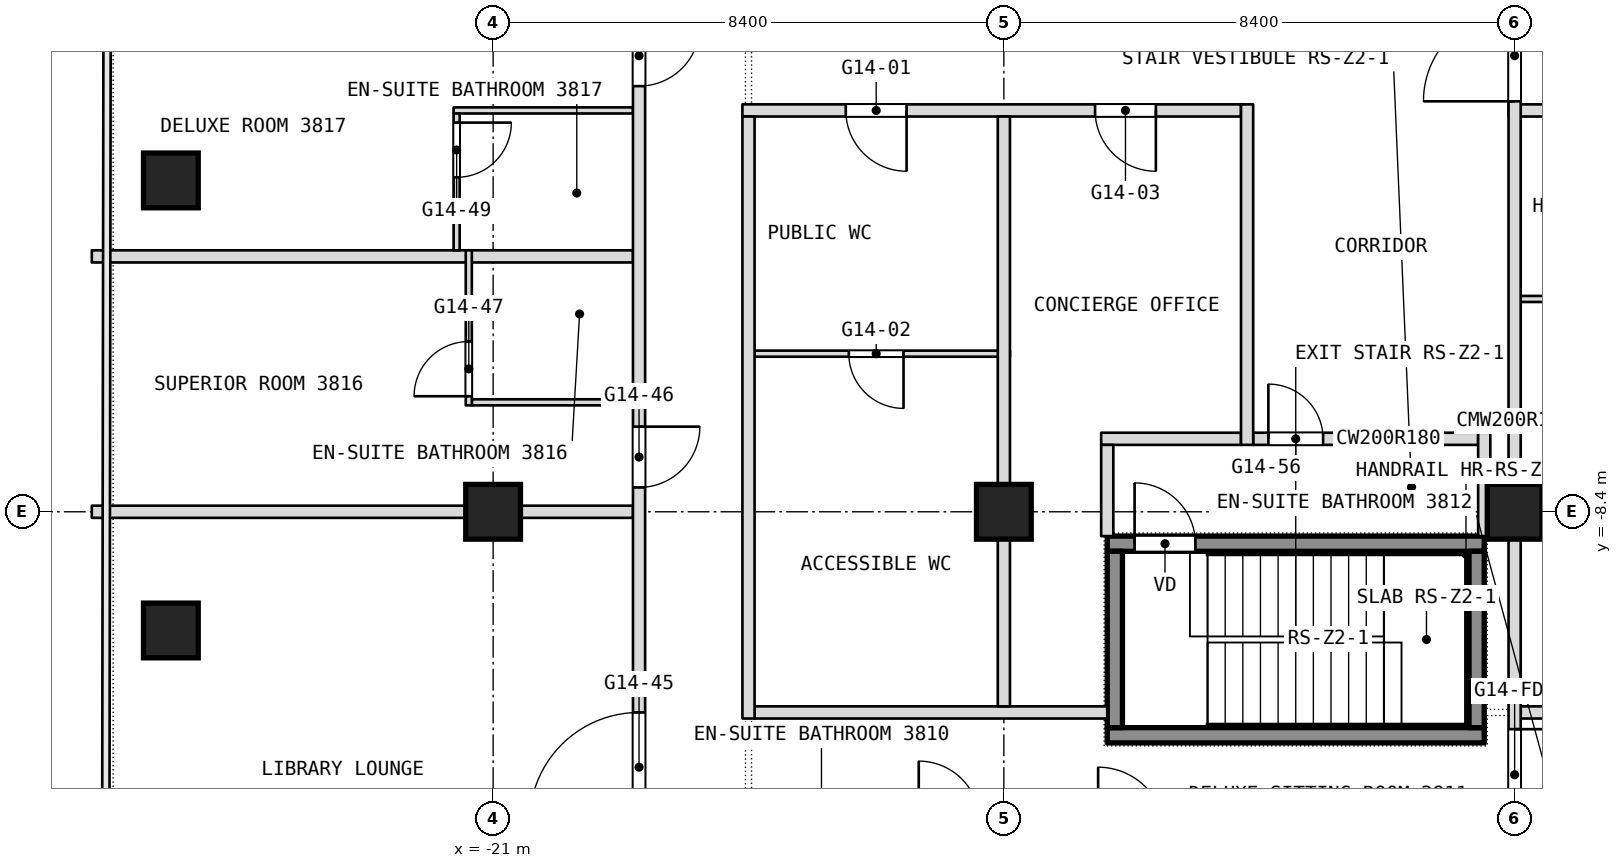
"""IFC4 building model, lengths in metres.
Left out: names, types, materials, properties, quantities, classifications, styles, units other than length and angle.
Written with IfcOpenShell. Run it as: python <this file> out.ifc"""

import sys

from ifc_helpers import new_model, si_unit, direction, frame, frame_2d, origin, origin_2d, place, context, subcontext, project, spatial, rectangle, extrude, element, fill, save


model = new_model("IFC4")
c1 = context("Model", 3, precision=1e-05, world=origin(), true_north=direction((0.0, 1.0)))
c2 = subcontext(c1, "Body", "Model", "MODEL_VIEW")
j1 = project(units=[si_unit("LENGTHUNIT", "METRE"), si_unit("PLANEANGLEUNIT", "RADIAN")], contexts=[c1])
p1 = place(None, origin())
s1 = spatial("IfcSite", under=j1, at=p1, CompositionType="ELEMENT")
p2 = place(p1, origin())
s2 = spatial("IfcBuilding", under=s1, at=p2, CompositionType="ELEMENT")
p3 = place(p2, frame((0.0, 0.0, 162.5)))
s3 = spatial("IfcBuildingStorey", under=s2, at=p3, CompositionType="ELEMENT", Elevation=162.5)
for number, where, z_axis, x_axis in (
    (1, (-21.0, -8.4, 0.0), (0.0, 0.0, 1.0), (1.0, 0.0, 0.0)),
    (2, (-12.6, -8.4, 0.0), (0.0, 0.0, 1.0), (1.0, 0.0, 0.0)),
    (3, (-4.2, -8.4, 0.0), (0.0, 0.0, 1.0), (1.0, 0.0, 0.0)),
    (4, (-26.3, -10.352, 0.0), (0.0, 0.0, 1.0), (1.0, 0.0, 0.0)),
    (5, (-26.3, -2.951, 0.0), (0.0, 0.0, 1.0), (1.0, 0.0, 0.0)),
):
    element("IfcColumn", number, at=place(p3, frame(where, z_axis=z_axis, x_axis=x_axis)), inside=s3, PredefinedType="COLUMN", context=c2, shape_type="SweptSolid", body=[
        extrude(rectangle(XDim=0.9, YDim=0.9, at=origin_2d()), origin(), (0.0, 0.0, 1.0), 3.6),
    ])
p4 = place(p3, frame((-16.7, -11.7, 0.0), z_axis=(0.0, 0.0, 1.0), x_axis=(1.0, 0.0, 0.0)))
e6 = element("IfcWall", 6, at=p4, inside=s3, PredefinedType="PARTITIONING", context=c2, shape_type="SweptSolid", body=[
    extrude(rectangle(XDim=5.8, YDim=0.2, at=frame_2d((2.9, 0.0))), origin(), (0.0, 0.0, 1.0), 3.34),
])
p5 = place(p3, frame((-4.1, -11.7, 0.0), z_axis=(0.0, 0.0, 1.0), x_axis=(1.0, 0.0, 0.0)))
e7 = element("IfcWall", 7, at=p5, inside=s3, PredefinedType="PARTITIONING", context=c2, shape_type="SweptSolid", body=[
    extrude(rectangle(XDim=20.8, YDim=0.2, at=frame_2d((10.4, 0.0))), origin(), (0.0, 0.0, 1.0), 3.34),
])
p6 = place(p5, frame((14.1, 0.0, 0.0)))
e8 = element("IfcOpeningElement", 8, at=p6, cuts=e7, PredefinedType="OPENING", context=c2, shape_type="SweptSolid", body=[
    extrude(rectangle(XDim=1.0, YDim=2.1, at=frame_2d((0.5, 1.05))), frame((0.0, 0.1, 0.0), z_axis=(0.0, -1.0, 0.0), x_axis=(1.0, 0.0, 0.0)), (0.0, 0.0, 1.0), 0.2),
])
p7 = place(p5, frame((5.7, 0.0, 0.0)))
e9 = element("IfcOpeningElement", 9, at=p7, cuts=e7, PredefinedType="OPENING", context=c2, shape_type="SweptSolid", body=[
    extrude(rectangle(XDim=1.0, YDim=2.1, at=frame_2d((0.5, 1.05))), frame((0.0, 0.1, 0.0), z_axis=(0.0, -1.0, 0.0), x_axis=(1.0, 0.0, 0.0)), (0.0, 0.0, 1.0), 0.2),
])
p8 = place(p3, frame((-27.6, -8.4, 0.0), z_axis=(0.0, 0.0, 1.0), x_axis=(1.0, 0.0, 0.0)))
e10 = element("IfcWall", 10, at=p8, inside=s3, PredefinedType="PARTITIONING", context=c2, shape_type="SweptSolid", body=[
    extrude(rectangle(XDim=8.9, YDim=0.2, at=frame_2d((4.45, 0.0))), origin(), (0.0, 0.0, 1.0), 2.89),
])
p9 = place(p3, frame((-11.0, -7.2, 0.0), z_axis=(0.0, 0.0, 1.0), x_axis=(1.0, 0.0, 0.0)))
e11 = element("IfcWall", 11, at=p9, inside=s3, PredefinedType="PARTITIONING", context=c2, shape_type="SweptSolid", body=[
    extrude(rectangle(XDim=2.3, YDim=0.2, at=frame_2d((1.15, 0.0))), origin(), (0.0, 0.0, 1.0), 3.34),
])
p10 = place(p3, frame((-8.5, -7.2, 0.0), z_axis=(0.0, 0.0, 1.0), x_axis=(1.0, 0.0, 0.0)))
e12 = element("IfcWall", 12, at=p10, inside=s3, PredefinedType="PARTITIONING", context=c2, shape_type="SweptSolid", body=[
    extrude(rectangle(XDim=3.7, YDim=0.2, at=frame_2d((1.85, 0.0))), origin(), (0.0, 0.0, 1.0), 3.34),
])
p11 = place(p10, frame((0.25, 0.0, 0.0)))
e13 = element("IfcOpeningElement", 13, at=p11, cuts=e12, PredefinedType="OPENING", context=c2, shape_type="SweptSolid", body=[
    extrude(rectangle(XDim=0.9, YDim=2.1, at=frame_2d((0.45, 1.05))), frame((0.0, 0.1, 0.0), z_axis=(0.0, -1.0, 0.0), x_axis=(1.0, 0.0, 0.0)), (0.0, 0.0, 1.0), 0.2),
])
p12 = place(p3, frame((-21.35, -6.6, 0.0), z_axis=(0.0, 0.0, 1.0), x_axis=(1.0, 0.0, 0.0)))
e14 = element("IfcWall", 14, at=p12, inside=s3, PredefinedType="PARTITIONING", context=c2, shape_type="SweptSolid", body=[
    extrude(rectangle(XDim=2.65, YDim=0.1, at=frame_2d((1.325, 0.0))), origin(), (0.0, 0.0, 1.0), 3.34),
])
p13 = place(p3, frame((-16.7, -5.8, 0.0), z_axis=(0.0, 0.0, 1.0), x_axis=(1.0, 0.0, 0.0)))
e15 = element("IfcWall", 15, at=p13, inside=s3, PredefinedType="PARTITIONING", context=c2, shape_type="SweptSolid", body=[
    extrude(rectangle(XDim=4.2, YDim=0.1, at=frame_2d((2.1, 0.0))), origin(), (0.0, 0.0, 1.0), 3.34),
])
p14 = place(p13, frame((1.55, 0.0, 0.0)))
e16 = element("IfcOpeningElement", 16, at=p14, cuts=e15, PredefinedType="OPENING", context=c2, shape_type="SweptSolid", body=[
    extrude(rectangle(XDim=0.9, YDim=2.1, at=frame_2d((0.45, 1.05))), frame((0.0, 0.05, 0.0), z_axis=(0.0, -1.0, 0.0), x_axis=(1.0, 0.0, 0.0)), (0.0, 0.0, 1.0), 0.1),
])
p15 = place(p3, frame((-4.1, -4.9, 0.0), z_axis=(0.0, 0.0, 1.0), x_axis=(1.0, 0.0, 0.0)))
e17 = element("IfcWall", 17, at=p15, inside=s3, PredefinedType="PARTITIONING", context=c2, shape_type="SweptSolid", body=[
    extrude(rectangle(XDim=4.2, YDim=0.1, at=frame_2d((2.1, 0.0))), origin(), (0.0, 0.0, 1.0), 3.34),
])
p16 = place(p15, frame((1.55, 0.0, 0.0)))
e18 = element("IfcOpeningElement", 18, at=p16, cuts=e17, PredefinedType="OPENING", context=c2, shape_type="SweptSolid", body=[
    extrude(rectangle(XDim=0.9, YDim=2.1, at=frame_2d((0.45, 1.05))), frame((0.0, 0.05, 0.0), z_axis=(0.0, -1.0, 0.0), x_axis=(1.0, 0.0, 0.0)), (0.0, 0.0, 1.0), 0.1),
])
p17 = place(p3, frame((-27.6, -4.2, 0.0), z_axis=(0.0, 0.0, 1.0), x_axis=(1.0, 0.0, 0.0)))
e19 = element("IfcWall", 19, at=p17, inside=s3, PredefinedType="PARTITIONING", context=c2, shape_type="SweptSolid", body=[
    extrude(rectangle(XDim=8.9, YDim=0.2, at=frame_2d((4.45, 0.0))), origin(), (0.0, 0.0, 1.0), 3.34),
])
p18 = place(p3, frame((-21.65, -1.8, 0.0), z_axis=(0.0, 0.0, 1.0), x_axis=(1.0, 0.0, 0.0)))
e20 = element("IfcWall", 20, at=p18, inside=s3, PredefinedType="PARTITIONING", context=c2, shape_type="SweptSolid", body=[
    extrude(rectangle(XDim=2.95, YDim=0.1, at=frame_2d((1.475, 0.0))), origin(), (0.0, 0.0, 1.0), 3.34),
])
p19 = place(p3, frame((-16.9, -1.8, 0.0), z_axis=(0.0, 0.0, 1.0), x_axis=(1.0, 0.0, 0.0)))
e21 = element("IfcWall", 21, at=p19, inside=s3, PredefinedType="PARTITIONING", context=c2, shape_type="SweptSolid", body=[
    extrude(rectangle(XDim=8.2, YDim=0.2, at=frame_2d((4.1, 0.0))), origin(), (0.0, 0.0, 1.0), 3.34),
])
p20 = place(p19, frame((1.7, 0.0, 0.0)))
e22 = element("IfcOpeningElement", 22, at=p20, cuts=e21, PredefinedType="OPENING", context=c2, shape_type="SweptSolid", body=[
    extrude(rectangle(XDim=1.0, YDim=2.1, at=frame_2d((0.5, 1.05))), frame((0.0, 0.1, 0.0), z_axis=(0.0, -1.0, 0.0), x_axis=(1.0, 0.0, 0.0)), (0.0, 0.0, 1.0), 0.2),
])
p21 = place(p19, frame((5.8, 0.0, 0.0)))
e23 = element("IfcOpeningElement", 23, at=p21, cuts=e21, PredefinedType="OPENING", context=c2, shape_type="SweptSolid", body=[
    extrude(rectangle(XDim=1.0, YDim=2.1, at=frame_2d((0.5, 1.05))), frame((0.0, 0.1, 0.0), z_axis=(0.0, -1.0, 0.0), x_axis=(1.0, 0.0, 0.0)), (0.0, 0.0, 1.0), 0.2),
])
p22 = place(p3, frame((-4.3, -1.8, 0.0), z_axis=(0.0, 0.0, 1.0), x_axis=(1.0, 0.0, 0.0)))
e24 = element("IfcWall", 24, at=p22, inside=s3, PredefinedType="PARTITIONING", context=c2, shape_type="SweptSolid", body=[
    extrude(rectangle(XDim=11.3, YDim=0.2, at=frame_2d((5.65, 0.0))), origin(), (0.0, 0.0, 1.0), 3.34),
])
p23 = place(p22, frame((1.7, 0.0, 0.0)))
e25 = element("IfcOpeningElement", 25, at=p23, cuts=e24, PredefinedType="OPENING", context=c2, shape_type="SweptSolid", body=[
    extrude(rectangle(XDim=1.0, YDim=2.1, at=frame_2d((0.5, 1.05))), frame((0.0, 0.1, 0.0), z_axis=(0.0, -1.0, 0.0), x_axis=(1.0, 0.0, 0.0)), (0.0, 0.0, 1.0), 0.2),
])
p24 = place(p22, frame((10.1, 0.0, 0.0)))
e26 = element("IfcOpeningElement", 26, at=p24, cuts=e24, PredefinedType="OPENING", context=c2, shape_type="SweptSolid", body=[
    extrude(rectangle(XDim=1.0, YDim=2.1, at=frame_2d((0.5, 1.05))), frame((0.0, 0.1, 0.0), z_axis=(0.0, -1.0, 0.0), x_axis=(1.0, 0.0, 0.0)), (0.0, 0.0, 1.0), 0.2),
])
p25 = place(p22, frame((5.9, 0.0, 0.0)))
e27 = element("IfcOpeningElement", 27, at=p25, cuts=e24, PredefinedType="OPENING", context=c2, shape_type="SweptSolid", body=[
    extrude(rectangle(XDim=1.0, YDim=2.1, at=frame_2d((0.5, 1.05))), frame((0.0, 0.1, 0.0), z_axis=(0.0, -1.0, 0.0), x_axis=(1.0, 0.0, 0.0)), (0.0, 0.0, 1.0), 0.2),
])
p26 = place(p3, frame((-4.2, -13.8, 0.0), z_axis=(0.0, 0.0, 1.0), x_axis=(0.0, 1.0, 0.0)))
e28 = element("IfcWall", 28, at=p26, inside=s3, PredefinedType="PARTITIONING", context=c2, shape_type="SweptSolid", body=[
    extrude(rectangle(XDim=13.8, YDim=0.2, at=frame_2d((6.9, 0.0))), origin(), (0.0, 0.0, 1.0), 3.34),
])
p27 = place(p26, frame((12.15, 0.0, 0.0)))
e29 = element("IfcOpeningElement", 29, at=p27, cuts=e28, PredefinedType="OPENING", context=c2, shape_type="SweptSolid", body=[
    extrude(rectangle(XDim=1.5, YDim=2.1, at=frame_2d((0.75, 1.05))), frame((0.0, 0.1, 0.0), z_axis=(0.0, -1.0, 0.0), x_axis=(1.0, 0.0, 0.0)), (0.0, 0.0, 1.0), 0.2),
])
p28 = place(p26, frame((0.325, 0.0, 0.0)))
e30 = element("IfcOpeningElement", 30, at=p28, cuts=e28, PredefinedType="OPENING", context=c2, shape_type="SweptSolid", body=[
    extrude(rectangle(XDim=1.5, YDim=2.1, at=frame_2d((0.75, 1.05))), frame((0.0, 0.1, 0.0), z_axis=(0.0, -1.0, 0.0), x_axis=(1.0, 0.0, 0.0)), (0.0, 0.0, 1.0), 0.2),
])
p29 = place(p3, frame((-4.7, -8.8, 0.0), z_axis=(0.0, 0.0, 1.0), x_axis=(0.0, 1.0, 0.0)))
e31 = element("IfcWall", 31, at=p29, inside=s3, PredefinedType="PARTITIONING", context=c2, shape_type="SweptSolid", body=[
    extrude(rectangle(XDim=1.7, YDim=0.2, at=frame_2d((0.85, 0.0))), origin(), (0.0, 0.0, 1.0), 3.34),
])
p30 = place(p3, frame((-8.6, -7.3, 0.0), z_axis=(0.0, 0.0, 1.0), x_axis=(0.0, 1.0, 0.0)))
e32 = element("IfcWall", 32, at=p30, inside=s3, PredefinedType="PARTITIONING", context=c2, shape_type="SweptSolid", body=[
    extrude(rectangle(XDim=5.6, YDim=0.2, at=frame_2d((2.8, 0.0))), origin(), (0.0, 0.0, 1.0), 3.34),
])
p31 = place(p3, frame((-10.9, -8.8, 0.0), z_axis=(0.0, 0.0, 1.0), x_axis=(0.0, 1.0, 0.0)))
e33 = element("IfcWall", 33, at=p31, inside=s3, PredefinedType="PARTITIONING", context=c2, shape_type="SweptSolid", body=[
    extrude(rectangle(XDim=1.5, YDim=0.2, at=frame_2d((0.75, 0.0))), origin(), (0.0, 0.0, 1.0), 3.34),
])
p32 = place(p3, frame((-12.6, -11.6, 0.0), z_axis=(0.0, 0.0, 1.0), x_axis=(0.0, 1.0, 0.0)))
e34 = element("IfcWall", 34, at=p32, inside=s3, PredefinedType="PARTITIONING", context=c2, shape_type="SweptSolid", body=[
    extrude(rectangle(XDim=9.7, YDim=0.2, at=frame_2d((4.85, 0.0))), origin(), (0.0, 0.0, 1.0), 3.34),
])
p33 = place(p3, frame((-16.8, -11.8, 0.0), z_axis=(0.0, 0.0, 1.0), x_axis=(0.0, 1.0, 0.0)))
e35 = element("IfcWall", 35, at=p33, inside=s3, PredefinedType="PARTITIONING", context=c2, shape_type="SweptSolid", body=[
    extrude(rectangle(XDim=9.9, YDim=0.2, at=frame_2d((4.95, 0.0))), origin(), (0.0, 0.0, 1.0), 3.34),
])
p34 = place(p3, frame((-18.6, -21.708, 0.0), z_axis=(0.0, 0.0, 1.0), x_axis=(0.0, 1.0, 0.0)))
e36 = element("IfcWall", 36, at=p34, inside=s3, PredefinedType="PARTITIONING", context=c2, shape_type="SweptSolid", body=[
    extrude(rectangle(XDim=28.608, YDim=0.2, at=frame_2d((14.304, 0.0))), origin(), (0.0, 0.0, 1.0), 3.34),
])
p35 = place(p34, frame((2.204, 0.0, 0.0)))
e37 = element("IfcOpeningElement", 37, at=p35, cuts=e36, PredefinedType="OPENING", context=c2, shape_type="SweptSolid", body=[
    extrude(rectangle(XDim=1.0, YDim=2.1, at=frame_2d((0.5, 1.05))), frame((0.0, 0.1, 0.0), z_axis=(0.0, -1.0, 0.0), x_axis=(1.0, 0.0, 0.0)), (0.0, 0.0, 1.0), 0.2),
])
p36 = place(p34, frame((8.208, 0.0, 0.0)))
e38 = element("IfcOpeningElement", 38, at=p36, cuts=e36, PredefinedType="OPENING", context=c2, shape_type="SweptSolid", body=[
    extrude(rectangle(XDim=1.8, YDim=2.1, at=frame_2d((0.9, 1.05))), frame((0.0, 0.1, 0.0), z_axis=(0.0, -1.0, 0.0), x_axis=(1.0, 0.0, 0.0)), (0.0, 0.0, 1.0), 0.2),
])
p37 = place(p34, frame((13.708, 0.0, 0.0)))
e39 = element("IfcOpeningElement", 39, at=p37, cuts=e36, PredefinedType="OPENING", context=c2, shape_type="SweptSolid", body=[
    extrude(rectangle(XDim=1.0, YDim=2.1, at=frame_2d((0.5, 1.05))), frame((0.0, 0.1, 0.0), z_axis=(0.0, -1.0, 0.0), x_axis=(1.0, 0.0, 0.0)), (0.0, 0.0, 1.0), 0.2),
])
p38 = place(p34, frame((20.308, 0.0, 0.0)))
e40 = element("IfcOpeningElement", 40, at=p38, cuts=e36, PredefinedType="OPENING", context=c2, shape_type="SweptSolid", body=[
    extrude(rectangle(XDim=1.0, YDim=2.1, at=frame_2d((0.5, 1.05))), frame((0.0, 0.1, 0.0), z_axis=(0.0, -1.0, 0.0), x_axis=(1.0, 0.0, 0.0)), (0.0, 0.0, 1.0), 0.2),
])
p39 = place(p3, frame((-21.4, -6.65, 0.0), z_axis=(0.0, 0.0, 1.0), x_axis=(0.0, 1.0, 0.0)))
e41 = element("IfcWall", 41, at=p39, inside=s3, PredefinedType="PARTITIONING", context=c2, shape_type="SweptSolid", body=[
    extrude(rectangle(XDim=2.55, YDim=0.1, at=frame_2d((1.275, 0.0))), origin(), (0.0, 0.0, 1.0), 3.34),
])
p40 = place(p39, frame((0.15, 0.0, 0.0)))
e42 = element("IfcOpeningElement", 42, at=p40, cuts=e41, PredefinedType="OPENING", context=c2, shape_type="SweptSolid", body=[
    extrude(rectangle(XDim=0.9, YDim=2.1, at=frame_2d((0.45, 1.05))), frame((0.0, 0.05, 0.0), z_axis=(0.0, -1.0, 0.0), x_axis=(1.0, 0.0, 0.0)), (0.0, 0.0, 1.0), 0.1),
])
p41 = place(p3, frame((-21.6, -4.1, 0.0), z_axis=(0.0, 0.0, 1.0), x_axis=(0.0, 1.0, 0.0)))
e43 = element("IfcWall", 43, at=p41, inside=s3, PredefinedType="PARTITIONING", context=c2, shape_type="SweptSolid", body=[
    extrude(rectangle(XDim=2.25, YDim=0.1, at=frame_2d((1.125, 0.0))), origin(), (0.0, 0.0, 1.0), 3.34),
])
p42 = place(p41, frame((1.2, 0.0, 0.0)))
e44 = element("IfcOpeningElement", 44, at=p42, cuts=e43, PredefinedType="OPENING", context=c2, shape_type="SweptSolid", body=[
    extrude(rectangle(XDim=0.9, YDim=2.1, at=frame_2d((0.45, 1.05))), frame((0.0, 0.05, 0.0), z_axis=(0.0, -1.0, 0.0), x_axis=(1.0, 0.0, 0.0)), (0.0, 0.0, 1.0), 0.1),
])
p43 = place(p3, frame((-10.9, -12.075, 0.1), z_axis=(0.0, 0.0, 1.0), x_axis=(1.0, 0.0, 0.0)))
e45 = element("IfcWall", 45, at=p43, inside=s3, PredefinedType="SHEAR", context=c2, shape_type="SweptSolid", body=[
    extrude(rectangle(XDim=6.2, YDim=0.25, at=frame_2d((3.1, 0.0))), origin(), (0.0, 0.0, 1.0), 3.6),
])
p44 = place(p3, frame((-10.9, -8.925, 0.1), z_axis=(0.0, 0.0, 1.0), x_axis=(1.0, 0.0, 0.0)))
e46 = element("IfcWall", 46, at=p44, inside=s3, PredefinedType="SHEAR", context=c2, shape_type="SweptSolid", body=[
    extrude(rectangle(XDim=6.2, YDim=0.25, at=frame_2d((3.1, 0.0))), origin(), (0.0, 0.0, 1.0), 3.6),
])
p45 = place(p44, frame((0.45, 0.0, 0.0)))
e47 = element("IfcOpeningElement", 47, at=p45, cuts=e46, PredefinedType="OPENING", context=c2, shape_type="SweptSolid", body=[
    extrude(rectangle(XDim=1.0, YDim=2.1, at=frame_2d((0.5, 1.05))), frame((0.0, 0.125, 0.0), z_axis=(0.0, -1.0, 0.0), x_axis=(1.0, 0.0, 0.0)), (0.0, 0.0, 1.0), 0.25),
])
for number, where, z_axis, x_axis in (
    (48, (-10.775, -11.95, 0.1), (0.0, 0.0, 1.0), (0.0, 1.0, 0.0)),
    (49, (-4.825, -11.95, 0.1), (0.0, 0.0, 1.0), (0.0, 1.0, 0.0)),
):
    element("IfcWall", number, at=place(p3, frame(where, z_axis=z_axis, x_axis=x_axis)), inside=s3, PredefinedType="SHEAR", context=c2, shape_type="SweptSolid", body=[
        extrude(rectangle(XDim=2.9, YDim=0.25, at=frame_2d((1.45, 0.0))), origin(), (0.0, 0.0, 1.0), 3.6),
    ])
p46 = place(p11, origin())
e50 = element("IfcDoor", 50, at=p46, inside=s3, OperationType="SINGLE_SWING_RIGHT", PredefinedType="DOOR", context=c2, shape_type="SweptSolid", body=[
    extrude(rectangle(XDim=0.9, YDim=2.1, at=frame_2d((0.45, 1.05))), frame((0.0, 0.025, 0.0), z_axis=(0.0, -1.0, 0.0), x_axis=(1.0, 0.0, 0.0)), (0.0, 0.0, 1.0), 0.05),
])
fill(e13, e50)
p47 = place(p14, origin())
e51 = element("IfcDoor", 51, at=p47, inside=s3, OperationType="SINGLE_SWING_RIGHT", PredefinedType="DOOR", context=c2, shape_type="SweptSolid", body=[
    extrude(rectangle(XDim=0.9, YDim=2.1, at=frame_2d((0.45, 1.05))), frame((0.0, 0.025, 0.0), z_axis=(0.0, -1.0, 0.0), x_axis=(1.0, 0.0, 0.0)), (0.0, 0.0, 1.0), 0.05),
])
fill(e16, e51)
p48 = place(p20, origin())
e52 = element("IfcDoor", 52, at=p48, inside=s3, OperationType="SINGLE_SWING_LEFT", PredefinedType="DOOR", context=c2, shape_type="SweptSolid", body=[
    extrude(rectangle(XDim=1.0, YDim=2.1, at=frame_2d((0.5, 1.05))), frame((0.0, 0.025, 0.0), z_axis=(0.0, -1.0, 0.0), x_axis=(1.0, 0.0, 0.0)), (0.0, 0.0, 1.0), 0.05),
])
fill(e22, e52)
p49 = place(p21, origin())
e53 = element("IfcDoor", 53, at=p49, inside=s3, OperationType="SINGLE_SWING_LEFT", PredefinedType="DOOR", context=c2, shape_type="SweptSolid", body=[
    extrude(rectangle(XDim=1.0, YDim=2.1, at=frame_2d((0.5, 1.05))), frame((0.0, 0.025, 0.0), z_axis=(0.0, -1.0, 0.0), x_axis=(1.0, 0.0, 0.0)), (0.0, 0.0, 1.0), 0.05),
])
fill(e23, e53)
p50 = place(p36, origin())
e54 = element("IfcDoor", 54, at=p50, inside=s3, OperationType="DOUBLE_DOOR_SINGLE_SWING", PredefinedType="DOOR", context=c2, shape_type="SweptSolid", body=[
    extrude(rectangle(XDim=1.8, YDim=2.1, at=frame_2d((0.9, 1.05))), frame((0.0, 0.025, 0.0), z_axis=(0.0, -1.0, 0.0), x_axis=(1.0, 0.0, 0.0)), (0.0, 0.0, 1.0), 0.05),
])
fill(e38, e54)
p51 = place(p37, origin())
e55 = element("IfcDoor", 55, at=p51, inside=s3, OperationType="SINGLE_SWING_LEFT", PredefinedType="DOOR", context=c2, shape_type="SweptSolid", body=[
    extrude(rectangle(XDim=1.0, YDim=2.1, at=frame_2d((0.5, 1.05))), frame((0.0, 0.025, 0.0), z_axis=(0.0, -1.0, 0.0), x_axis=(1.0, 0.0, 0.0)), (0.0, 0.0, 1.0), 0.05),
])
fill(e39, e55)
p52 = place(p38, origin())
e56 = element("IfcDoor", 56, at=p52, inside=s3, OperationType="SINGLE_SWING_LEFT", PredefinedType="DOOR", context=c2, shape_type="SweptSolid", body=[
    extrude(rectangle(XDim=1.0, YDim=2.1, at=frame_2d((0.5, 1.05))), frame((0.0, 0.025, 0.0), z_axis=(0.0, -1.0, 0.0), x_axis=(1.0, 0.0, 0.0)), (0.0, 0.0, 1.0), 0.05),
])
fill(e40, e56)
p53 = place(p40, origin())
e57 = element("IfcDoor", 57, at=p53, inside=s3, OperationType="SINGLE_SWING_RIGHT", PredefinedType="DOOR", context=c2, shape_type="SweptSolid", body=[
    extrude(rectangle(XDim=0.9, YDim=2.1, at=frame_2d((0.45, 1.05))), frame((0.0, 0.025, 0.0), z_axis=(0.0, -1.0, 0.0), x_axis=(1.0, 0.0, 0.0)), (0.0, 0.0, 1.0), 0.05),
])
fill(e42, e57)
p54 = place(p42, origin())
e58 = element("IfcDoor", 58, at=p54, inside=s3, OperationType="SINGLE_SWING_LEFT", PredefinedType="DOOR", context=c2, shape_type="SweptSolid", body=[
    extrude(rectangle(XDim=0.9, YDim=2.1, at=frame_2d((0.45, 1.05))), frame((0.0, 0.025, 0.0), z_axis=(0.0, -1.0, 0.0), x_axis=(1.0, 0.0, 0.0)), (0.0, 0.0, 1.0), 0.05),
])
fill(e44, e58)
p55 = place(p45, origin())
e59 = element("IfcDoor", 59, at=p55, inside=s3, OperationType="SINGLE_SWING_LEFT", PredefinedType="DOOR", context=c2, shape_type="SweptSolid", body=[
    extrude(rectangle(XDim=1.0, YDim=2.1, at=frame_2d((0.5, 1.05))), frame((0.0, 0.025, 0.0), z_axis=(0.0, -1.0, 0.0), x_axis=(1.0, 0.0, 0.0)), (0.0, 0.0, 1.0), 0.05),
])
fill(e47, e59)
p56 = place(p27, origin())
e60 = element("IfcDoor", 60, at=p56, inside=s3, OperationType="DOUBLE_DOOR_DOUBLE_SWING", PredefinedType="DOOR", context=c2, shape_type="SweptSolid", body=[
    extrude(rectangle(XDim=1.5, YDim=2.1, at=frame_2d((0.75, 1.05))), frame((0.0, 0.025, 0.0), z_axis=(0.0, -1.0, 0.0), x_axis=(1.0, 0.0, 0.0)), (0.0, 0.0, 1.0), 0.05),
])
fill(e29, e60)
p57 = place(p28, origin())
e61 = element("IfcDoor", 61, at=p57, inside=s3, OperationType="DOUBLE_DOOR_DOUBLE_SWING", PredefinedType="DOOR", context=c2, shape_type="SweptSolid", body=[
    extrude(rectangle(XDim=1.5, YDim=2.1, at=frame_2d((0.75, 1.05))), frame((0.0, 0.025, 0.0), z_axis=(0.0, -1.0, 0.0), x_axis=(1.0, 0.0, 0.0)), (0.0, 0.0, 1.0), 0.05),
])
fill(e30, e61)
save(model, sys.argv[1])
